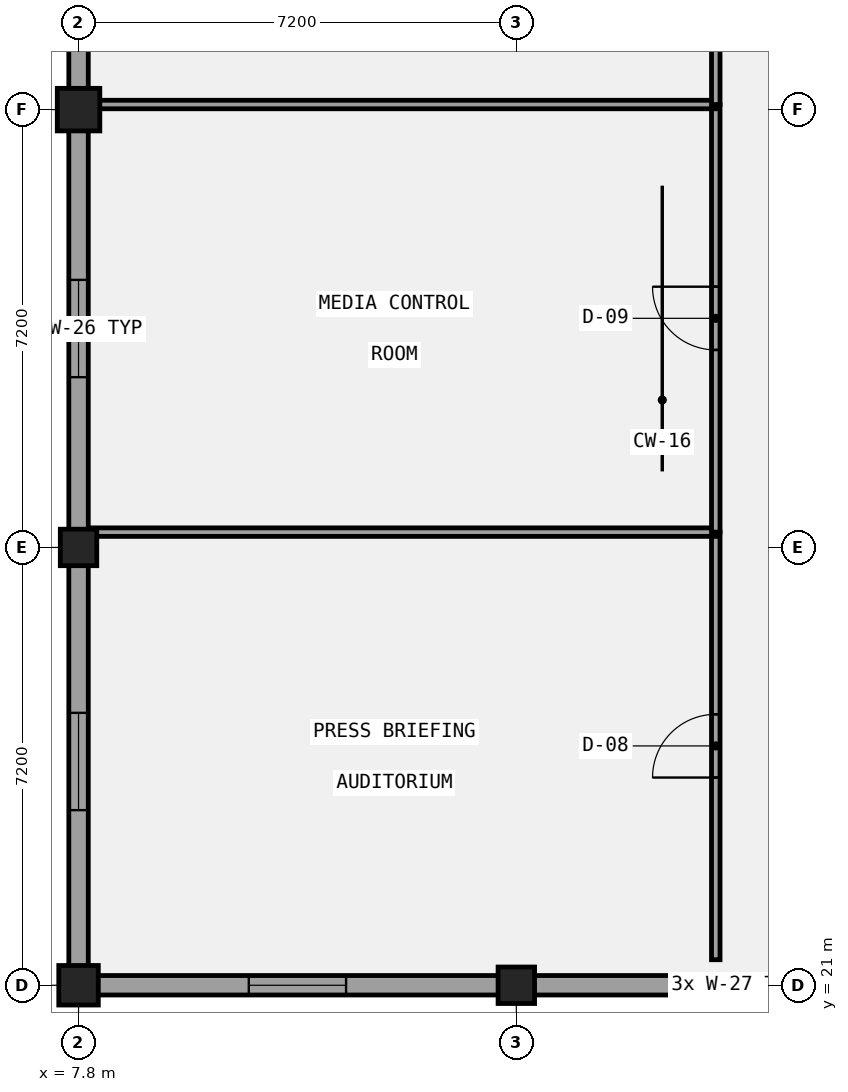
"""IFC4 building model, lengths in metres.
Left out: names, types, materials, properties, quantities, classifications, styles, units other than length and angle.
Written with IfcOpenShell. Run it as: python <this file> out.ifc"""

import sys

from ifc_helpers import new_model, si_unit, direction, frame, frame_2d, origin, origin_2d, place, context, subcontext, project, spatial, rectangle, extrude, element, fill, save


model = new_model("IFC4")
c1 = context("Model", 3, precision=1e-05, world=origin(), true_north=direction((0.0, 1.0)))
c2 = subcontext(c1, "Body", "Model", "MODEL_VIEW")
j1 = project(units=[si_unit("LENGTHUNIT", "METRE"), si_unit("PLANEANGLEUNIT", "RADIAN")], contexts=[c1])
p1 = place(None, origin())
s1 = spatial("IfcSite", under=j1, at=p1, CompositionType="ELEMENT")
p2 = place(p1, origin())
s2 = spatial("IfcBuilding", under=s1, at=p2, CompositionType="ELEMENT")
p3 = place(p2, frame((0.0, 0.0, 9.6)))
s3 = spatial("IfcBuildingStorey", under=s2, at=p3, CompositionType="ELEMENT", Elevation=9.6)
p4 = place(p3, frame((7.8, 21.0, 0.0), z_axis=(0.0, 0.0, 1.0), x_axis=(1.0, 0.0, 0.0)))
e1 = element("IfcColumn", 1, at=p4, inside=s3, PredefinedType="COLUMN", context=c2, shape_type="SweptSolid", body=[
    extrude(rectangle(XDim=0.65, YDim=0.65, at=origin_2d()), origin(), (0.0, 0.0, 1.0), 4.2),
])
p5 = place(p3, frame((7.8, 28.2, 0.0), z_axis=(0.0, 0.0, 1.0), x_axis=(1.0, 0.0, 0.0)))
e2 = element("IfcColumn", 2, at=p5, inside=s3, PredefinedType="COLUMN", context=c2, shape_type="SweptSolid", body=[
    extrude(rectangle(XDim=0.6, YDim=0.6, at=origin_2d()), origin(), (0.0, 0.0, 1.0), 4.2),
])
p6 = place(p3, frame((7.8, 35.4, 0.0), z_axis=(0.0, 0.0, 1.0), x_axis=(1.0, 0.0, 0.0)))
e3 = element("IfcColumn", 3, at=p6, inside=s3, PredefinedType="COLUMN", context=c2, shape_type="SweptSolid", body=[
    extrude(rectangle(XDim=0.7, YDim=0.7, at=origin_2d()), origin(), (0.0, 0.0, 1.0), 4.2),
])
p7 = place(p3, frame((15.0, 21.0, 0.0), z_axis=(0.0, 0.0, 1.0), x_axis=(1.0, 0.0, 0.0)))
e4 = element("IfcColumn", 4, at=p7, inside=s3, PredefinedType="COLUMN", context=c2, shape_type="SweptSolid", body=[
    extrude(rectangle(XDim=0.6, YDim=0.6, at=origin_2d()), origin(), (0.0, 0.0, 1.0), 4.2),
])
p8 = place(p3, frame((7.8, 56.84, 0.0), z_axis=(0.0, 0.0, 1.0), x_axis=(0.0, -1.0, 0.0)))
e5 = element("IfcWall", 5, at=p8, inside=s3, PredefinedType="SOLIDWALL", context=c2, shape_type="SweptSolid", body=[
    extrude(rectangle(XDim=35.68, YDim=0.32, at=frame_2d((17.84, 0.0))), origin(), (0.0, 0.0, 1.0), 3.09),
])
p9 = place(p8, frame((31.36, 0.0, 1.0)))
e6 = element("IfcOpeningElement", 6, at=p9, cuts=e5, PredefinedType="OPENING", context=c2, shape_type="SweptSolid", body=[
    extrude(rectangle(XDim=1.6, YDim=1.4, at=frame_2d((0.8, 0.7))), frame((0.0, 0.17, 0.0), z_axis=(0.0, -1.0, 0.0), x_axis=(1.0, 0.0, 0.0)), (0.0, 0.0, 1.0), 0.34),
])
p10 = place(p8, frame((24.24, 0.0, 1.0)))
e7 = element("IfcOpeningElement", 7, at=p10, cuts=e5, PredefinedType="OPENING", context=c2, shape_type="SweptSolid", body=[
    extrude(rectangle(XDim=1.6, YDim=1.4, at=frame_2d((0.8, 0.7))), frame((0.0, 0.17, 0.0), z_axis=(0.0, -1.0, 0.0), x_axis=(1.0, 0.0, 0.0)), (0.0, 0.0, 1.0), 0.34),
])
p11 = place(p8, frame((17.04, 0.0, 1.0)))
e8 = element("IfcOpeningElement", 8, at=p11, cuts=e5, PredefinedType="OPENING", context=c2, shape_type="SweptSolid", body=[
    extrude(rectangle(XDim=1.6, YDim=1.4, at=frame_2d((0.8, 0.7))), frame((0.0, 0.17, 0.0), z_axis=(0.0, -1.0, 0.0), x_axis=(1.0, 0.0, 0.0)), (0.0, 0.0, 1.0), 0.34),
])
p12 = place(p8, frame((9.84, 0.0, 1.0)))
e9 = element("IfcOpeningElement", 9, at=p12, cuts=e5, PredefinedType="OPENING", context=c2, shape_type="SweptSolid", body=[
    extrude(rectangle(XDim=1.6, YDim=1.4, at=frame_2d((0.8, 0.7))), frame((0.0, 0.17, 0.0), z_axis=(0.0, -1.0, 0.0), x_axis=(1.0, 0.0, 0.0)), (0.0, 0.0, 1.0), 0.34),
])
p13 = place(p8, frame((2.72, 0.0, 1.0)))
e10 = element("IfcOpeningElement", 10, at=p13, cuts=e5, PredefinedType="OPENING", context=c2, shape_type="SweptSolid", body=[
    extrude(rectangle(XDim=1.6, YDim=1.4, at=frame_2d((0.8, 0.7))), frame((0.0, 0.17, 0.0), z_axis=(0.0, -1.0, 0.0), x_axis=(1.0, 0.0, 0.0)), (0.0, 0.0, 1.0), 0.34),
])
p14 = place(p3, frame((7.64, 21.0, 0.0), z_axis=(0.0, 0.0, 1.0), x_axis=(1.0, 0.0, 0.0)))
e11 = element("IfcWall", 11, at=p14, inside=s3, PredefinedType="SOLIDWALL", context=c2, shape_type="SweptSolid", body=[
    extrude(rectangle(XDim=21.92, YDim=0.32, at=frame_2d((10.96, 0.0))), origin(), (0.0, 0.0, 1.0), 2.94),
])
p15 = place(p14, frame((2.96, 0.0, 1.0)))
e12 = element("IfcOpeningElement", 12, at=p15, cuts=e11, PredefinedType="OPENING", context=c2, shape_type="SweptSolid", body=[
    extrude(rectangle(XDim=1.6, YDim=1.65, at=frame_2d((0.8, 0.825))), frame((0.0, 0.17, 0.0), z_axis=(0.0, -1.0, 0.0), x_axis=(1.0, 0.0, 0.0)), (0.0, 0.0, 1.0), 0.34),
])
p16 = place(p14, frame((10.16, 0.0, 1.0)))
e13 = element("IfcOpeningElement", 13, at=p16, cuts=e11, PredefinedType="OPENING", context=c2, shape_type="SweptSolid", body=[
    extrude(rectangle(XDim=1.6, YDim=1.65, at=frame_2d((0.8, 0.825))), frame((0.0, 0.17, 0.0), z_axis=(0.0, -1.0, 0.0), x_axis=(1.0, 0.0, 0.0)), (0.0, 0.0, 1.0), 0.34),
])
p17 = place(p14, frame((17.36, 0.0, 1.0)))
e14 = element("IfcOpeningElement", 14, at=p17, cuts=e11, PredefinedType="OPENING", context=c2, shape_type="SweptSolid", body=[
    extrude(rectangle(XDim=1.6, YDim=1.65, at=frame_2d((0.8, 0.825))), frame((0.0, 0.17, 0.0), z_axis=(0.0, -1.0, 0.0), x_axis=(1.0, 0.0, 0.0)), (0.0, 0.0, 1.0), 0.34),
])
p18 = place(p3, frame((18.28, 21.42, 0.0), z_axis=(0.0, 0.0, 1.0), x_axis=(0.0, 1.0, 0.0)))
e15 = element("IfcWall", 15, at=p18, inside=s3, PredefinedType="PARTITIONING", context=c2, shape_type="SweptSolid", body=[
    extrude(rectangle(XDim=7.032, YDim=0.14, at=frame_2d((3.516, 0.0))), origin(), (0.0, 0.0, 1.0), 3.94),
])
p19 = place(p18, frame((2.996, 0.0, 0.0)))
e16 = element("IfcOpeningElement", 16, at=p19, cuts=e15, PredefinedType="OPENING", context=c2, shape_type="SweptSolid", body=[
    extrude(rectangle(XDim=1.04, YDim=2.22, at=frame_2d((0.52, 1.11))), frame((0.0, 0.08, 0.0), z_axis=(0.0, -1.0, 0.0), x_axis=(1.0, 0.0, 0.0)), (0.0, 0.0, 1.0), 0.16),
])
p20 = place(p3, frame((7.98, 28.452, 0.0), z_axis=(0.0, 0.0, 1.0), x_axis=(1.0, 0.0, 0.0)))
e17 = element("IfcWall", 17, at=p20, inside=s3, PredefinedType="PARTITIONING", context=c2, shape_type="SweptSolid", body=[
    extrude(rectangle(XDim=10.3, YDim=0.14, at=frame_2d((5.15, 0.0))), origin(), (0.0, 0.0, 1.0), 2.74),
])
p21 = place(p3, frame((18.28, 28.452, 0.0), z_axis=(0.0, 0.0, 1.0), x_axis=(0.0, 1.0, 0.0)))
e18 = element("IfcWall", 18, at=p21, inside=s3, PredefinedType="PARTITIONING", context=c2, shape_type="SweptSolid", body=[
    extrude(rectangle(XDim=7.032, YDim=0.14, at=frame_2d((3.516, 0.0))), origin(), (0.0, 0.0, 1.0), 3.94),
])
p22 = place(p21, frame((2.996, 0.0, 0.0)))
e19 = element("IfcOpeningElement", 19, at=p22, cuts=e18, PredefinedType="OPENING", context=c2, shape_type="SweptSolid", body=[
    extrude(rectangle(XDim=1.04, YDim=2.35, at=frame_2d((0.52, 1.175))), frame((0.0, 0.08, 0.0), z_axis=(0.0, -1.0, 0.0), x_axis=(1.0, 0.0, 0.0)), (0.0, 0.0, 1.0), 0.16),
])
p23 = place(p3, frame((7.98, 35.484, 0.0), z_axis=(0.0, 0.0, 1.0), x_axis=(1.0, 0.0, 0.0)))
e20 = element("IfcWall", 20, at=p23, inside=s3, PredefinedType="PARTITIONING", context=c2, shape_type="SweptSolid", body=[
    extrude(rectangle(XDim=10.3, YDim=0.14, at=frame_2d((5.15, 0.0))), origin(), (0.0, 0.0, 1.0), 2.74),
])
p24 = place(p3, frame((18.28, 35.484, 0.0), z_axis=(0.0, 0.0, 1.0), x_axis=(0.0, 1.0, 0.0)))
e21 = element("IfcWall", 21, at=p24, inside=s3, PredefinedType="PARTITIONING", context=c2, shape_type="SweptSolid", body=[
    extrude(rectangle(XDim=7.032, YDim=0.14, at=frame_2d((3.516, 0.0))), origin(), (0.0, 0.0, 1.0), 3.94),
])
p25 = place(p24, frame((2.966, 0.0, 0.0)))
e22 = element("IfcOpeningElement", 22, at=p25, cuts=e21, PredefinedType="OPENING", context=c2, shape_type="SweptSolid", body=[
    extrude(rectangle(XDim=1.1, YDim=2.1, at=frame_2d((0.55, 1.05))), frame((0.0, 0.08, 0.0), z_axis=(0.0, -1.0, 0.0), x_axis=(1.0, 0.0, 0.0)), (0.0, 0.0, 1.0), 0.16),
])
p26 = place(p9, origin())
e23 = element("IfcWindow", 23, at=p26, inside=s3, PartitioningType="SINGLE_PANEL", PredefinedType="WINDOW", context=c2, shape_type="SweptSolid", body=[
    extrude(rectangle(XDim=1.6, YDim=1.4, at=frame_2d((0.8, 0.7))), frame((0.0, 0.03, 0.0), z_axis=(0.0, -1.0, 0.0), x_axis=(1.0, 0.0, 0.0)), (0.0, 0.0, 1.0), 0.06),
])
fill(e6, e23)
p27 = place(p10, origin())
e24 = element("IfcWindow", 24, at=p27, inside=s3, PartitioningType="SINGLE_PANEL", PredefinedType="WINDOW", context=c2, shape_type="SweptSolid", body=[
    extrude(rectangle(XDim=1.6, YDim=1.4, at=frame_2d((0.8, 0.7))), frame((0.0, 0.03, 0.0), z_axis=(0.0, -1.0, 0.0), x_axis=(1.0, 0.0, 0.0)), (0.0, 0.0, 1.0), 0.06),
])
fill(e7, e24)
p28 = place(p15, origin())
e25 = element("IfcWindow", 25, at=p28, inside=s3, PartitioningType="SINGLE_PANEL", PredefinedType="WINDOW", context=c2, shape_type="SweptSolid", body=[
    extrude(rectangle(XDim=1.6, YDim=1.65, at=frame_2d((0.8, 0.825))), frame((0.0, 0.03, 0.0), z_axis=(0.0, -1.0, 0.0), x_axis=(1.0, 0.0, 0.0)), (0.0, 0.0, 1.0), 0.06),
])
fill(e12, e25)
p29 = place(p16, origin())
e26 = element("IfcWindow", 26, at=p29, inside=s3, PartitioningType="SINGLE_PANEL", PredefinedType="WINDOW", context=c2, shape_type="SweptSolid", body=[
    extrude(rectangle(XDim=1.6, YDim=1.65, at=frame_2d((0.8, 0.825))), frame((0.0, 0.03, 0.0), z_axis=(0.0, -1.0, 0.0), x_axis=(1.0, 0.0, 0.0)), (0.0, 0.0, 1.0), 0.06),
])
fill(e13, e26)
p30 = place(p19, frame((1.04, 0.0, 0.0), z_axis=(0.0, 0.0, 1.0), x_axis=(-1.0, 0.0, 0.0)))
e27 = element("IfcDoor", 27, at=p30, inside=s3, OperationType="SINGLE_SWING_LEFT", PredefinedType="DOOR", context=c2, shape_type="SweptSolid", body=[
    extrude(rectangle(XDim=1.04, YDim=2.22, at=frame_2d((0.52, 1.11))), frame((0.0, 0.025, 0.0), z_axis=(0.0, -1.0, 0.0), x_axis=(1.0, 0.0, 0.0)), (0.0, 0.0, 1.0), 0.05),
])
fill(e16, e27)
p31 = place(p22, frame((1.04, 0.0, 0.0), z_axis=(0.0, 0.0, 1.0), x_axis=(-1.0, 0.0, 0.0)))
e28 = element("IfcDoor", 28, at=p31, inside=s3, OperationType="SINGLE_SWING_RIGHT", PredefinedType="DOOR", context=c2, shape_type="SweptSolid", body=[
    extrude(rectangle(XDim=1.04, YDim=2.35, at=frame_2d((0.52, 1.175))), frame((0.0, 0.025, 0.0), z_axis=(0.0, -1.0, 0.0), x_axis=(1.0, 0.0, 0.0)), (0.0, 0.0, 1.0), 0.05),
])
fill(e19, e28)
save(model, sys.argv[1])
